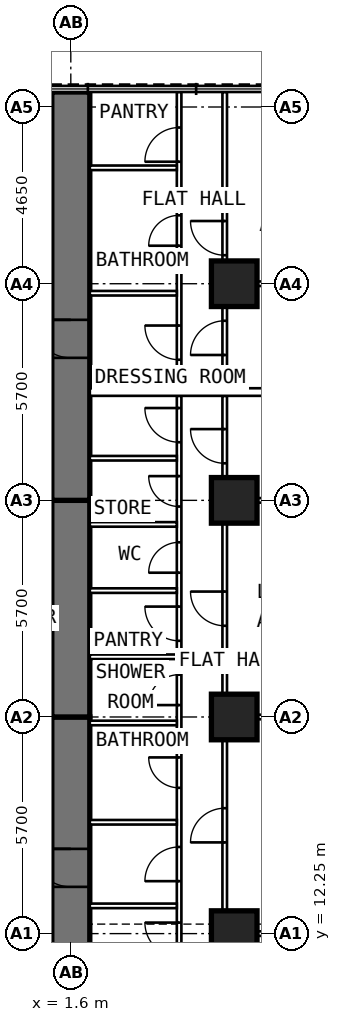
"""IFC4 building model, lengths in metres.
Left out: names, types, materials, properties, quantities, classifications, styles, units other than length and angle.
Written with IfcOpenShell. Run it as: python <this file> out.ifc"""

import sys

from ifc_helpers import new_model, si_unit, direction, frame, frame_2d, origin, origin_2d, place, context, subcontext, project, spatial, rectangle, extrude, element, fill, save


model = new_model("IFC4")
c1 = context("Model", 3, precision=1e-05, world=origin(), true_north=direction((0.0, 1.0)))
c2 = subcontext(c1, "Body", "Model", "MODEL_VIEW")
j1 = project(units=[si_unit("LENGTHUNIT", "METRE"), si_unit("PLANEANGLEUNIT", "RADIAN")], contexts=[c1])
p1 = place(None, origin())
s1 = spatial("IfcSite", under=j1, at=p1, CompositionType="ELEMENT")
p2 = place(p1, origin())
s2 = spatial("IfcBuilding", under=s1, at=p2, CompositionType="ELEMENT")
p3 = place(p2, frame((0.0, 0.0, 68.2)))
s3 = spatial("IfcBuildingStorey", under=s2, at=p3, CompositionType="ELEMENT", Elevation=68.2)
for number, where, z_axis, x_axis in (
    (1, (5.9, 12.25, 0.0), (0.0, 0.0, 1.0), (0.0, 1.0, 0.0)),
    (2, (5.9, 17.95, 0.0), (0.0, 0.0, 1.0), (0.0, 1.0, 0.0)),
    (3, (5.9, 23.65, 0.0), (0.0, 0.0, 1.0), (0.0, 1.0, 0.0)),
    (4, (5.9, 29.35, 0.0), (0.0, 0.0, 1.0), (0.0, 1.0, 0.0)),
):
    element("IfcColumn", number, at=place(p3, frame(where, z_axis=z_axis, x_axis=x_axis)), inside=s3, PredefinedType="COLUMN", context=c2, shape_type="SweptSolid", body=[
        extrude(rectangle(XDim=1.2, YDim=1.2, at=origin_2d()), origin(), (0.0, 0.0, 1.0), 3.6),
    ])
p4 = place(p3, frame((1.6, 9.6, 0.0), z_axis=(0.0, 0.0, 1.0), x_axis=(0.0, 1.0, 0.0)))
e5 = element("IfcWall", 5, at=p4, inside=s3, PredefinedType="SHEAR", context=c2, shape_type="SweptSolid", body=[
    extrude(rectangle(XDim=8.35, YDim=1.0, at=frame_2d((4.175, 0.0))), origin(), (0.0, 0.0, 1.0), 3.6),
])
p5 = place(p4, frame((3.88, 0.0, 0.0)))
e6 = element("IfcOpeningElement", 6, at=p5, cuts=e5, PredefinedType="OPENING", context=c2, shape_type="SweptSolid", body=[
    extrude(rectangle(XDim=1.0, YDim=2.1, at=frame_2d((0.5, 1.05))), frame((0.0, 0.512, 0.0), z_axis=(0.0, -1.0, 0.0), x_axis=(1.0, 0.0, 0.0)), (0.0, 0.0, 1.0), 1.024),
])
p6 = place(p3, frame((1.6, 17.95, 0.0), z_axis=(0.0, 0.0, 1.0), x_axis=(0.0, 1.0, 0.0)))
e7 = element("IfcWall", 7, at=p6, inside=s3, PredefinedType="SHEAR", context=c2, shape_type="SweptSolid", body=[
    extrude(rectangle(XDim=5.7, YDim=1.0, at=frame_2d((2.85, 0.0))), origin(), (0.0, 0.0, 1.0), 3.6),
])
p7 = place(p3, frame((1.6, 23.65, 0.0), z_axis=(0.0, 0.0, 1.0), x_axis=(0.0, 1.0, 0.0)))
e8 = element("IfcWall", 8, at=p7, inside=s3, PredefinedType="SHEAR", context=c2, shape_type="SweptSolid", body=[
    extrude(rectangle(XDim=10.745, YDim=1.0, at=frame_2d((5.373, 0.0))), origin(), (0.0, 0.0, 1.0), 3.6),
])
p8 = place(p7, frame((3.75, 0.0, 0.0)))
e9 = element("IfcOpeningElement", 9, at=p8, cuts=e8, PredefinedType="OPENING", context=c2, shape_type="SweptSolid", body=[
    extrude(rectangle(XDim=1.0, YDim=2.1, at=frame_2d((0.5, 1.05))), frame((0.0, 0.512, 0.0), z_axis=(0.0, -1.0, 0.0), x_axis=(1.0, 0.0, 0.0)), (0.0, 0.0, 1.0), 1.024),
])
p9 = place(p3, frame((4.45, 10.1, 0.0), z_axis=(0.0, 0.0, 1.0), x_axis=(0.0, 1.0, 0.0)))
e10 = element("IfcWall", 10, at=p9, inside=s3, PredefinedType="PARTITIONING", context=c2, shape_type="SweptSolid", body=[
    extrude(rectangle(XDim=16.3, YDim=0.12, at=frame_2d((8.15, 0.0))), origin(), (0.0, 0.0, 1.0), 3.35),
])
p10 = place(p9, frame((1.54, 0.0, 0.0)))
e11 = element("IfcOpeningElement", 11, at=p10, cuts=e10, PredefinedType="OPENING", context=c2, shape_type="SweptSolid", body=[
    extrude(rectangle(XDim=0.9, YDim=2.1, at=frame_2d((0.45, 1.05))), frame((0.0, 0.072, 0.0), z_axis=(0.0, -1.0, 0.0), x_axis=(1.0, 0.0, 0.0)), (0.0, 0.0, 1.0), 0.144),
])
p11 = place(p9, frame((3.53, 0.0, 0.0)))
e12 = element("IfcOpeningElement", 12, at=p11, cuts=e10, PredefinedType="OPENING", context=c2, shape_type="SweptSolid", body=[
    extrude(rectangle(XDim=0.9, YDim=2.1, at=frame_2d((0.45, 1.05))), frame((0.0, 0.072, 0.0), z_axis=(0.0, -1.0, 0.0), x_axis=(1.0, 0.0, 0.0)), (0.0, 0.0, 1.0), 0.144),
])
p12 = place(p9, frame((5.986, 0.0, 0.0)))
e13 = element("IfcOpeningElement", 13, at=p12, cuts=e10, PredefinedType="OPENING", context=c2, shape_type="SweptSolid", body=[
    extrude(rectangle(XDim=0.8, YDim=2.1, at=frame_2d((0.4, 1.05))), frame((0.0, 0.072, 0.0), z_axis=(0.0, -1.0, 0.0), x_axis=(1.0, 0.0, 0.0)), (0.0, 0.0, 1.0), 0.144),
])
p13 = place(p9, frame((8.163, 0.0, 0.0)))
e14 = element("IfcOpeningElement", 14, at=p13, cuts=e10, PredefinedType="OPENING", context=c2, shape_type="SweptSolid", body=[
    extrude(rectangle(XDim=0.8, YDim=2.1, at=frame_2d((0.4, 1.05))), frame((0.0, 0.072, 0.0), z_axis=(0.0, -1.0, 0.0), x_axis=(1.0, 0.0, 0.0)), (0.0, 0.0, 1.0), 0.144),
])
p14 = place(p9, frame((9.855, 0.0, 0.0)))
e15 = element("IfcOpeningElement", 15, at=p14, cuts=e10, PredefinedType="OPENING", context=c2, shape_type="SweptSolid", body=[
    extrude(rectangle(XDim=0.9, YDim=2.1, at=frame_2d((0.45, 1.05))), frame((0.0, 0.072, 0.0), z_axis=(0.0, -1.0, 0.0), x_axis=(1.0, 0.0, 0.0)), (0.0, 0.0, 1.0), 0.144),
])
p15 = place(p9, frame((11.646, 0.0, 0.0)))
e16 = element("IfcOpeningElement", 16, at=p15, cuts=e10, PredefinedType="OPENING", context=c2, shape_type="SweptSolid", body=[
    extrude(rectangle(XDim=0.8, YDim=2.1, at=frame_2d((0.4, 1.05))), frame((0.0, 0.072, 0.0), z_axis=(0.0, -1.0, 0.0), x_axis=(1.0, 0.0, 0.0)), (0.0, 0.0, 1.0), 0.144),
])
p16 = place(p9, frame((13.388, 0.0, 0.0)))
e17 = element("IfcOpeningElement", 17, at=p16, cuts=e10, PredefinedType="OPENING", context=c2, shape_type="SweptSolid", body=[
    extrude(rectangle(XDim=0.8, YDim=2.1, at=frame_2d((0.4, 1.05))), frame((0.0, 0.072, 0.0), z_axis=(0.0, -1.0, 0.0), x_axis=(1.0, 0.0, 0.0)), (0.0, 0.0, 1.0), 0.144),
])
p17 = place(p9, frame((15.079, 0.0, 0.0)))
e18 = element("IfcOpeningElement", 18, at=p17, cuts=e10, PredefinedType="OPENING", context=c2, shape_type="SweptSolid", body=[
    extrude(rectangle(XDim=0.9, YDim=2.1, at=frame_2d((0.45, 1.05))), frame((0.0, 0.072, 0.0), z_axis=(0.0, -1.0, 0.0), x_axis=(1.0, 0.0, 0.0)), (0.0, 0.0, 1.0), 0.144),
])
p18 = place(p3, frame((5.65, 9.6, 0.0), z_axis=(0.0, 0.0, 1.0), x_axis=(0.0, 1.0, 0.0)))
e19 = element("IfcWall", 19, at=p18, inside=s3, PredefinedType="PARTITIONING", context=c2, shape_type="SweptSolid", body=[
    extrude(rectangle(XDim=16.8, YDim=0.12, at=frame_2d((8.4, 0.0))), origin(), (0.0, 0.0, 1.0), 3.35),
])
p19 = place(p18, frame((1.0, 0.0, 0.0)))
e20 = element("IfcOpeningElement", 20, at=p19, cuts=e19, PredefinedType="OPENING", context=c2, shape_type="SweptSolid", body=[
    extrude(rectangle(XDim=0.9, YDim=2.1, at=frame_2d((0.45, 1.05))), frame((0.0, 0.072, 0.0), z_axis=(0.0, -1.0, 0.0), x_axis=(1.0, 0.0, 0.0)), (0.0, 0.0, 1.0), 0.144),
])
p20 = place(p18, frame((5.05, 0.0, 0.0)))
e21 = element("IfcOpeningElement", 21, at=p20, cuts=e19, PredefinedType="OPENING", context=c2, shape_type="SweptSolid", body=[
    extrude(rectangle(XDim=0.9, YDim=2.1, at=frame_2d((0.45, 1.05))), frame((0.0, 0.072, 0.0), z_axis=(0.0, -1.0, 0.0), x_axis=(1.0, 0.0, 0.0)), (0.0, 0.0, 1.0), 0.144),
])
p21 = place(p18, frame((10.75, 0.0, 0.0)))
e22 = element("IfcOpeningElement", 22, at=p21, cuts=e19, PredefinedType="OPENING", context=c2, shape_type="SweptSolid", body=[
    extrude(rectangle(XDim=0.9, YDim=2.1, at=frame_2d((0.45, 1.05))), frame((0.0, 0.072, 0.0), z_axis=(0.0, -1.0, 0.0), x_axis=(1.0, 0.0, 0.0)), (0.0, 0.0, 1.0), 0.144),
])
p22 = place(p18, frame((15.025, 0.0, 0.0)))
e23 = element("IfcOpeningElement", 23, at=p22, cuts=e19, PredefinedType="OPENING", context=c2, shape_type="SweptSolid", body=[
    extrude(rectangle(XDim=0.9, YDim=2.1, at=frame_2d((0.45, 1.05))), frame((0.0, 0.072, 0.0), z_axis=(0.0, -1.0, 0.0), x_axis=(1.0, 0.0, 0.0)), (0.0, 0.0, 1.0), 0.144),
])
for number, where, z_axis, x_axis in (
    (24, (5.71, 12.25, 0.0), (0.0, 0.0, 1.0), (1.0, 0.0, 0.0)),
    (25, (5.71, 17.95, 0.0), (0.0, 0.0, 1.0), (1.0, 0.0, 0.0)),
    (26, (5.71, 23.65, 0.0), (0.0, 0.0, 1.0), (1.0, 0.0, 0.0)),
):
    element("IfcWall", number, at=place(p3, frame(where, z_axis=z_axis, x_axis=x_axis)), inside=s3, PredefinedType="PARTITIONING", context=c2, shape_type="SweptSolid", body=[
        extrude(rectangle(XDim=4.99, YDim=0.12, at=frame_2d((2.495, 0.0))), origin(), (0.0, 0.0, 1.0), 2.45),
    ])
for number, where, z_axis, x_axis in (
    (27, (2.1, 12.98, 0.0), (0.0, 0.0, 1.0), (1.0, 0.0, 0.0)),
    (28, (2.1, 15.18, 0.0), (0.0, 0.0, 1.0), (1.0, 0.0, 0.0)),
):
    element("IfcWall", number, at=place(p3, frame(where, z_axis=z_axis, x_axis=x_axis)), inside=s3, PredefinedType="PARTITIONING", context=c2, shape_type="SweptSolid", body=[
        extrude(rectangle(XDim=2.29, YDim=0.12, at=frame_2d((1.145, 0.0))), origin(), (0.0, 0.0, 1.0), 3.35),
    ])
p23 = place(p3, frame((2.1, 17.792, 0.0), z_axis=(0.0, 0.0, 1.0), x_axis=(1.0, 0.0, 0.0)))
e29 = element("IfcWall", 29, at=p23, inside=s3, PredefinedType="PARTITIONING", context=c2, shape_type="SweptSolid", body=[
    extrude(rectangle(XDim=2.29, YDim=0.12, at=frame_2d((1.145, 0.0))), origin(), (0.0, 0.0, 1.0), 2.45),
])
for number, where, z_axis, x_axis in (
    (30, (2.1, 19.534, 0.0), (0.0, 0.0, 1.0), (1.0, 0.0, 0.0)),
    (31, (2.1, 21.275, 0.0), (0.0, 0.0, 1.0), (1.0, 0.0, 0.0)),
    (32, (2.1, 23.017, 0.0), (0.0, 0.0, 1.0), (1.0, 0.0, 0.0)),
    (33, (2.1, 24.759, 0.0), (0.0, 0.0, 1.0), (1.0, 0.0, 0.0)),
):
    element("IfcWall", number, at=place(p3, frame(where, z_axis=z_axis, x_axis=x_axis)), inside=s3, PredefinedType="PARTITIONING", context=c2, shape_type="SweptSolid", body=[
        extrude(rectangle(XDim=2.29, YDim=0.12, at=frame_2d((1.145, 0.0))), origin(), (0.0, 0.0, 1.0), 3.35),
    ])
p24 = place(p3, frame((4.45, 26.6, 0.0), z_axis=(0.0, 0.0, 1.0), x_axis=(0.0, 1.0, 0.0)))
e34 = element("IfcWall", 34, at=p24, inside=s3, PredefinedType="PARTITIONING", context=c2, shape_type="SweptSolid", body=[
    extrude(rectangle(XDim=7.795, YDim=0.12, at=frame_2d((3.897, 0.0))), origin(), (0.0, 0.0, 1.0), 3.35),
])
p25 = place(p24, frame((0.75, 0.0, 0.0)))
e35 = element("IfcOpeningElement", 35, at=p25, cuts=e34, PredefinedType="OPENING", context=c2, shape_type="SweptSolid", body=[
    extrude(rectangle(XDim=0.9, YDim=2.1, at=frame_2d((0.45, 1.05))), frame((0.0, 0.072, 0.0), z_axis=(0.0, -1.0, 0.0), x_axis=(1.0, 0.0, 0.0)), (0.0, 0.0, 1.0), 0.144),
])
p26 = place(p24, frame((3.75, 0.0, 0.0)))
e36 = element("IfcOpeningElement", 36, at=p26, cuts=e34, PredefinedType="OPENING", context=c2, shape_type="SweptSolid", body=[
    extrude(rectangle(XDim=0.8, YDim=2.1, at=frame_2d((0.4, 1.05))), frame((0.0, 0.072, 0.0), z_axis=(0.0, -1.0, 0.0), x_axis=(1.0, 0.0, 0.0)), (0.0, 0.0, 1.0), 0.144),
])
p27 = place(p24, frame((5.96, 0.0, 0.0)))
e37 = element("IfcOpeningElement", 37, at=p27, cuts=e34, PredefinedType="OPENING", context=c2, shape_type="SweptSolid", body=[
    extrude(rectangle(XDim=0.9, YDim=2.1, at=frame_2d((0.45, 1.05))), frame((0.0, 0.072, 0.0), z_axis=(0.0, -1.0, 0.0), x_axis=(1.0, 0.0, 0.0)), (0.0, 0.0, 1.0), 0.144),
])
p28 = place(p3, frame((5.65, 26.6, 0.0), z_axis=(0.0, 0.0, 1.0), x_axis=(0.0, 1.0, 0.0)))
e38 = element("IfcWall", 38, at=p28, inside=s3, PredefinedType="PARTITIONING", context=c2, shape_type="SweptSolid", body=[
    extrude(rectangle(XDim=7.795, YDim=0.12, at=frame_2d((3.897, 0.0))), origin(), (0.0, 0.0, 1.0), 3.35),
])
p29 = place(p28, frame((0.875, 0.0, 0.0)))
e39 = element("IfcOpeningElement", 39, at=p29, cuts=e38, PredefinedType="OPENING", context=c2, shape_type="SweptSolid", body=[
    extrude(rectangle(XDim=0.9, YDim=2.1, at=frame_2d((0.45, 1.05))), frame((0.0, 0.072, 0.0), z_axis=(0.0, -1.0, 0.0), x_axis=(1.0, 0.0, 0.0)), (0.0, 0.0, 1.0), 0.144),
])
p30 = place(p28, frame((3.5, 0.0, 0.0)))
e40 = element("IfcOpeningElement", 40, at=p30, cuts=e38, PredefinedType="OPENING", context=c2, shape_type="SweptSolid", body=[
    extrude(rectangle(XDim=0.9, YDim=2.1, at=frame_2d((0.45, 1.05))), frame((0.0, 0.072, 0.0), z_axis=(0.0, -1.0, 0.0), x_axis=(1.0, 0.0, 0.0)), (0.0, 0.0, 1.0), 0.144),
])
p31 = place(p3, frame((5.71, 29.35, 0.0), z_axis=(0.0, 0.0, 1.0), x_axis=(1.0, 0.0, 0.0)))
e41 = element("IfcWall", 41, at=p31, inside=s3, PredefinedType="PARTITIONING", context=c2, shape_type="SweptSolid", body=[
    extrude(rectangle(XDim=4.99, YDim=0.12, at=frame_2d((2.495, 0.0))), origin(), (0.0, 0.0, 1.0), 2.45),
])
p32 = place(p3, frame((2.1, 29.1, 0.0), z_axis=(0.0, 0.0, 1.0), x_axis=(1.0, 0.0, 0.0)))
e42 = element("IfcWall", 42, at=p32, inside=s3, PredefinedType="PARTITIONING", context=c2, shape_type="SweptSolid", body=[
    extrude(rectangle(XDim=2.29, YDim=0.12, at=frame_2d((1.145, 0.0))), origin(), (0.0, 0.0, 1.0), 2.45),
])
p33 = place(p3, frame((2.1, 32.4, 0.0), z_axis=(0.0, 0.0, 1.0), x_axis=(1.0, 0.0, 0.0)))
e43 = element("IfcWall", 43, at=p33, inside=s3, PredefinedType="PARTITIONING", context=c2, shape_type="SweptSolid", body=[
    extrude(rectangle(XDim=2.29, YDim=0.12, at=frame_2d((1.145, 0.0))), origin(), (0.0, 0.0, 1.0), 3.35),
])
p34 = place(p3, frame((2.1, 26.5, 0.0), z_axis=(0.0, 0.0, 1.0), x_axis=(1.0, 0.0, 0.0)))
e44 = element("IfcWall", 44, at=p34, inside=s3, PredefinedType="PARTITIONING", context=c2, shape_type="SweptSolid", body=[
    extrude(rectangle(XDim=8.6, YDim=0.2, at=frame_2d((4.3, 0.0))), origin(), (0.0, 0.0, 1.0), 3.35),
])
p35 = place(p5, origin())
e45 = element("IfcDoor", 45, at=p35, inside=s3, OperationType="SINGLE_SWING_RIGHT", PredefinedType="DOOR", context=c2, shape_type="SweptSolid", body=[
    extrude(rectangle(XDim=1.0, YDim=2.1, at=frame_2d((0.5, 1.05))), frame((0.0, 0.25, 0.0), z_axis=(0.0, -1.0, 0.0), x_axis=(1.0, 0.0, 0.0)), (0.0, 0.0, 1.0), 0.5),
])
fill(e6, e45)
p36 = place(p20, origin())
e46 = element("IfcDoor", 46, at=p36, inside=s3, OperationType="SINGLE_SWING_LEFT", PredefinedType="DOOR", context=c2, shape_type="SweptSolid", body=[
    extrude(rectangle(XDim=0.9, YDim=2.1, at=frame_2d((0.45, 1.05))), frame((0.0, 0.025, 0.0), z_axis=(0.0, -1.0, 0.0), x_axis=(1.0, 0.0, 0.0)), (0.0, 0.0, 1.0), 0.05),
])
fill(e21, e46)
p37 = place(p21, origin())
e47 = element("IfcDoor", 47, at=p37, inside=s3, OperationType="SINGLE_SWING_RIGHT", PredefinedType="DOOR", context=c2, shape_type="SweptSolid", body=[
    extrude(rectangle(XDim=0.9, YDim=2.1, at=frame_2d((0.45, 1.05))), frame((0.0, 0.025, 0.0), z_axis=(0.0, -1.0, 0.0), x_axis=(1.0, 0.0, 0.0)), (0.0, 0.0, 1.0), 0.05),
])
fill(e22, e47)
p38 = place(p22, origin())
e48 = element("IfcDoor", 48, at=p38, inside=s3, OperationType="SINGLE_SWING_RIGHT", PredefinedType="DOOR", context=c2, shape_type="SweptSolid", body=[
    extrude(rectangle(XDim=0.9, YDim=2.1, at=frame_2d((0.45, 1.05))), frame((0.0, 0.025, 0.0), z_axis=(0.0, -1.0, 0.0), x_axis=(1.0, 0.0, 0.0)), (0.0, 0.0, 1.0), 0.05),
])
fill(e23, e48)
p39 = place(p10, origin())
e49 = element("IfcDoor", 49, at=p39, inside=s3, OperationType="SINGLE_SWING_RIGHT", PredefinedType="DOOR", context=c2, shape_type="SweptSolid", body=[
    extrude(rectangle(XDim=0.9, YDim=2.1, at=frame_2d((0.45, 1.05))), frame((0.0, 0.025, 0.0), z_axis=(0.0, -1.0, 0.0), x_axis=(1.0, 0.0, 0.0)), (0.0, 0.0, 1.0), 0.05),
])
fill(e11, e49)
p40 = place(p11, origin())
e50 = element("IfcDoor", 50, at=p40, inside=s3, OperationType="SINGLE_SWING_LEFT", PredefinedType="DOOR", context=c2, shape_type="SweptSolid", body=[
    extrude(rectangle(XDim=0.9, YDim=2.1, at=frame_2d((0.45, 1.05))), frame((0.0, 0.025, 0.0), z_axis=(0.0, -1.0, 0.0), x_axis=(1.0, 0.0, 0.0)), (0.0, 0.0, 1.0), 0.05),
])
fill(e12, e50)
p41 = place(p12, origin())
e51 = element("IfcDoor", 51, at=p41, inside=s3, OperationType="SINGLE_SWING_RIGHT", PredefinedType="DOOR", context=c2, shape_type="SweptSolid", body=[
    extrude(rectangle(XDim=0.8, YDim=2.1, at=frame_2d((0.4, 1.05))), frame((0.0, 0.025, 0.0), z_axis=(0.0, -1.0, 0.0), x_axis=(1.0, 0.0, 0.0)), (0.0, 0.0, 1.0), 0.05),
])
fill(e13, e51)
p42 = place(p13, origin())
e52 = element("IfcDoor", 52, at=p42, inside=s3, OperationType="SINGLE_SWING_LEFT", PredefinedType="DOOR", context=c2, shape_type="SweptSolid", body=[
    extrude(rectangle(XDim=0.8, YDim=2.1, at=frame_2d((0.4, 1.05))), frame((0.0, 0.025, 0.0), z_axis=(0.0, -1.0, 0.0), x_axis=(1.0, 0.0, 0.0)), (0.0, 0.0, 1.0), 0.05),
])
fill(e14, e52)
p43 = place(p14, origin())
e53 = element("IfcDoor", 53, at=p43, inside=s3, OperationType="SINGLE_SWING_RIGHT", PredefinedType="DOOR", context=c2, shape_type="SweptSolid", body=[
    extrude(rectangle(XDim=0.9, YDim=2.1, at=frame_2d((0.45, 1.05))), frame((0.0, 0.025, 0.0), z_axis=(0.0, -1.0, 0.0), x_axis=(1.0, 0.0, 0.0)), (0.0, 0.0, 1.0), 0.05),
])
fill(e15, e53)
p44 = place(p15, origin())
e54 = element("IfcDoor", 54, at=p44, inside=s3, OperationType="SINGLE_SWING_LEFT", PredefinedType="DOOR", context=c2, shape_type="SweptSolid", body=[
    extrude(rectangle(XDim=0.8, YDim=2.1, at=frame_2d((0.4, 1.05))), frame((0.0, 0.025, 0.0), z_axis=(0.0, -1.0, 0.0), x_axis=(1.0, 0.0, 0.0)), (0.0, 0.0, 1.0), 0.05),
])
fill(e16, e54)
p45 = place(p16, origin())
e55 = element("IfcDoor", 55, at=p45, inside=s3, OperationType="SINGLE_SWING_RIGHT", PredefinedType="DOOR", context=c2, shape_type="SweptSolid", body=[
    extrude(rectangle(XDim=0.8, YDim=2.1, at=frame_2d((0.4, 1.05))), frame((0.0, 0.025, 0.0), z_axis=(0.0, -1.0, 0.0), x_axis=(1.0, 0.0, 0.0)), (0.0, 0.0, 1.0), 0.05),
])
fill(e17, e55)
p46 = place(p17, origin())
e56 = element("IfcDoor", 56, at=p46, inside=s3, OperationType="SINGLE_SWING_RIGHT", PredefinedType="DOOR", context=c2, shape_type="SweptSolid", body=[
    extrude(rectangle(XDim=0.9, YDim=2.1, at=frame_2d((0.45, 1.05))), frame((0.0, 0.025, 0.0), z_axis=(0.0, -1.0, 0.0), x_axis=(1.0, 0.0, 0.0)), (0.0, 0.0, 1.0), 0.05),
])
fill(e18, e56)
p47 = place(p8, origin())
e57 = element("IfcDoor", 57, at=p47, inside=s3, OperationType="SINGLE_SWING_RIGHT", PredefinedType="DOOR", context=c2, shape_type="SweptSolid", body=[
    extrude(rectangle(XDim=1.0, YDim=2.1, at=frame_2d((0.5, 1.05))), frame((0.0, 0.25, 0.0), z_axis=(0.0, -1.0, 0.0), x_axis=(1.0, 0.0, 0.0)), (0.0, 0.0, 1.0), 0.5),
])
fill(e9, e57)
p48 = place(p29, origin())
e58 = element("IfcDoor", 58, at=p48, inside=s3, OperationType="SINGLE_SWING_LEFT", PredefinedType="DOOR", context=c2, shape_type="SweptSolid", body=[
    extrude(rectangle(XDim=0.9, YDim=2.1, at=frame_2d((0.45, 1.05))), frame((0.0, 0.025, 0.0), z_axis=(0.0, -1.0, 0.0), x_axis=(1.0, 0.0, 0.0)), (0.0, 0.0, 1.0), 0.05),
])
fill(e39, e58)
p49 = place(p30, origin())
e59 = element("IfcDoor", 59, at=p49, inside=s3, OperationType="SINGLE_SWING_RIGHT", PredefinedType="DOOR", context=c2, shape_type="SweptSolid", body=[
    extrude(rectangle(XDim=0.9, YDim=2.1, at=frame_2d((0.45, 1.05))), frame((0.0, 0.025, 0.0), z_axis=(0.0, -1.0, 0.0), x_axis=(1.0, 0.0, 0.0)), (0.0, 0.0, 1.0), 0.05),
])
fill(e40, e59)
p50 = place(p25, origin())
e60 = element("IfcDoor", 60, at=p50, inside=s3, OperationType="SINGLE_SWING_RIGHT", PredefinedType="DOOR", context=c2, shape_type="SweptSolid", body=[
    extrude(rectangle(XDim=0.9, YDim=2.1, at=frame_2d((0.45, 1.05))), frame((0.0, 0.025, 0.0), z_axis=(0.0, -1.0, 0.0), x_axis=(1.0, 0.0, 0.0)), (0.0, 0.0, 1.0), 0.05),
])
fill(e35, e60)
p51 = place(p26, origin())
e61 = element("IfcDoor", 61, at=p51, inside=s3, OperationType="SINGLE_SWING_LEFT", PredefinedType="DOOR", context=c2, shape_type="SweptSolid", body=[
    extrude(rectangle(XDim=0.8, YDim=2.1, at=frame_2d((0.4, 1.05))), frame((0.0, 0.025, 0.0), z_axis=(0.0, -1.0, 0.0), x_axis=(1.0, 0.0, 0.0)), (0.0, 0.0, 1.0), 0.05),
])
fill(e36, e61)
p52 = place(p27, origin())
e62 = element("IfcDoor", 62, at=p52, inside=s3, OperationType="SINGLE_SWING_LEFT", PredefinedType="DOOR", context=c2, shape_type="SweptSolid", body=[
    extrude(rectangle(XDim=0.9, YDim=2.1, at=frame_2d((0.45, 1.05))), frame((0.0, 0.025, 0.0), z_axis=(0.0, -1.0, 0.0), x_axis=(1.0, 0.0, 0.0)), (0.0, 0.0, 1.0), 0.05),
])
fill(e37, e62)
save(model, sys.argv[1])
